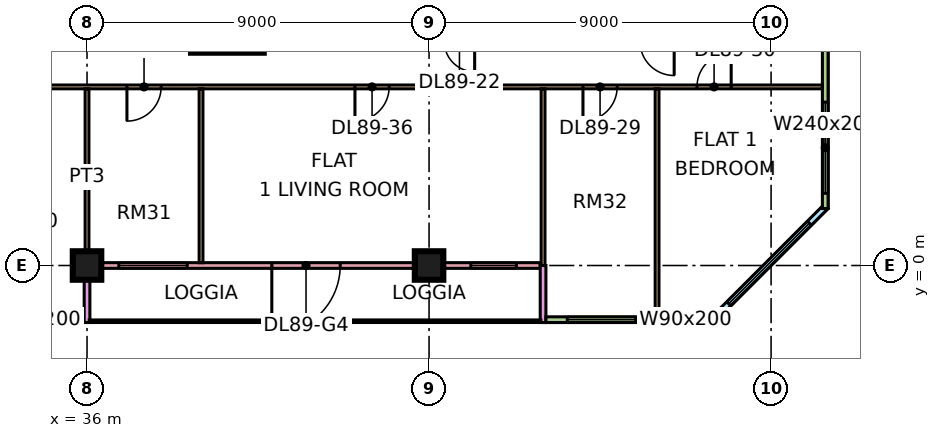
"""IFC4 building model, lengths in metres.
Left out: names, types, materials, properties, quantities, classifications, styles, units other than length and angle.
Written with IfcOpenShell. Run it as: python <this file> out.ifc"""

import sys

from ifc_helpers import new_model, si_unit, direction, frame, frame_2d, origin, origin_2d, place, context, subcontext, project, spatial, rectangle, extrude, element, fill, save


model = new_model("IFC4")
c1 = context("Model", 3, precision=1e-05, world=origin(), true_north=direction((0.0, 1.0)))
c2 = subcontext(c1, "Body", "Model", "MODEL_VIEW")
j1 = project(units=[si_unit("LENGTHUNIT", "METRE"), si_unit("PLANEANGLEUNIT", "RADIAN")], contexts=[c1])
p1 = place(None, origin())
s1 = spatial("IfcSite", under=j1, at=p1, CompositionType="ELEMENT")
p2 = place(p1, origin())
s2 = spatial("IfcBuilding", under=s1, at=p2, CompositionType="ELEMENT")
p3 = place(p2, frame((0.0, 0.0, 380.15)))
s3 = spatial("IfcBuildingStorey", under=s2, at=p3, CompositionType="ELEMENT", Elevation=380.15)
for number, where, z_axis, x_axis in (
    (1, (36.0, 0.0, 0.0), (0.0, 0.0, 1.0), (1.0, 0.0, 0.0)),
    (2, (45.0, 0.0, 0.0), (0.0, 0.0, 1.0), (1.0, 0.0, 0.0)),
):
    element("IfcColumn", number, at=place(p3, frame(where, z_axis=z_axis, x_axis=x_axis)), inside=s3, PredefinedType="COLUMN", context=c2, shape_type="SweptSolid", body=[
        extrude(rectangle(XDim=0.75, YDim=0.75, at=origin_2d()), origin(), (0.0, 0.0, 1.0), 3.75),
    ])
p4 = place(p3, frame((37.2, 5.725, 0.0), z_axis=(0.0, 0.0, 1.0), x_axis=(1.0, 0.0, 0.0)))
e3 = element("IfcWall", 3, at=p4, inside=s3, PredefinedType="SHEAR", context=c2, shape_type="SweptSolid", body=[
    extrude(rectangle(XDim=3.45, YDim=0.25, at=frame_2d((1.725, 0.0))), origin(), (0.0, 0.0, 1.0), 3.75),
])
p5 = place(p3, frame((24.075, -1.425, 0.0), z_axis=(0.0, 0.0, 1.0), x_axis=(1.0, 0.0, 0.0)))
e4 = element("IfcWall", 4, at=p5, inside=s3, PredefinedType="SOLIDWALL", context=c2, shape_type="SweptSolid", body=[
    extrude(rectangle(XDim=11.85, YDim=0.15, at=frame_2d((5.925, 0.0))), origin(), (0.0, 0.0, 1.0), 3.3),
])
p6 = place(p5, frame((2.962, 0.0, 0.45)))
e5 = element("IfcOpeningElement", 5, at=p6, cuts=e4, PredefinedType="OPENING", context=c2, shape_type="SweptSolid", body=[
    extrude(rectangle(XDim=3.0, YDim=2.0, at=frame_2d((1.5, 1.0))), frame((0.0, 0.085, 0.0), z_axis=(0.0, -1.0, 0.0), x_axis=(1.0, 0.0, 0.0)), (0.0, 0.0, 1.0), 0.17),
])
p7 = place(p5, frame((9.488, 0.0, 0.45)))
e6 = element("IfcOpeningElement", 6, at=p7, cuts=e4, PredefinedType="OPENING", context=c2, shape_type="SweptSolid", body=[
    extrude(rectangle(XDim=1.8, YDim=2.0, at=frame_2d((0.9, 1.0))), frame((0.0, 0.085, 0.0), z_axis=(0.0, -1.0, 0.0), x_axis=(1.0, 0.0, 0.0)), (0.0, 0.0, 1.0), 0.17),
])
p8 = place(p3, frame((36.075, 0.0, 0.0), z_axis=(0.0, 0.0, 1.0), x_axis=(1.0, 0.0, 0.0)))
e7 = element("IfcWall", 7, at=p8, inside=s3, PredefinedType="SOLIDWALL", context=c2, shape_type="SweptSolid", body=[
    extrude(rectangle(XDim=11.85, YDim=0.15, at=frame_2d((5.925, 0.0))), origin(), (0.0, 0.0, 1.0), 3.3),
])
p9 = place(p8, frame((0.762, 0.0, 0.45)))
e8 = element("IfcOpeningElement", 8, at=p9, cuts=e7, PredefinedType="OPENING", context=c2, shape_type="SweptSolid", body=[
    extrude(rectangle(XDim=1.8, YDim=2.0, at=frame_2d((0.9, 1.0))), frame((0.0, 0.085, 0.0), z_axis=(0.0, -1.0, 0.0), x_axis=(1.0, 0.0, 0.0)), (0.0, 0.0, 1.0), 0.17),
])
p10 = place(p8, frame((4.788, 0.0, 0.0)))
e9 = element("IfcOpeningElement", 9, at=p10, cuts=e7, PredefinedType="OPENING", context=c2, shape_type="SweptSolid", body=[
    extrude(rectangle(XDim=1.8, YDim=2.4, at=frame_2d((0.9, 1.2))), frame((0.0, 0.085, 0.0), z_axis=(0.0, -1.0, 0.0), x_axis=(1.0, 0.0, 0.0)), (0.0, 0.0, 1.0), 0.17),
])
p11 = place(p8, frame((10.025, 0.0, 0.45)))
e10 = element("IfcOpeningElement", 10, at=p11, cuts=e7, PredefinedType="OPENING", context=c2, shape_type="SweptSolid", body=[
    extrude(rectangle(XDim=1.2, YDim=2.0, at=frame_2d((0.6, 1.0))), frame((0.0, 0.085, 0.0), z_axis=(0.0, -1.0, 0.0), x_axis=(1.0, 0.0, 0.0)), (0.0, 0.0, 1.0), 0.17),
])
for number, where, z_axis, x_axis in (
    (11, (36.0, -1.5, 0.0), (0.0, 0.0, 1.0), (0.0, 1.0, 0.0)),
    (12, (48.0, -1.5, 0.0), (0.0, 0.0, 1.0), (0.0, 1.0, 0.0)),
):
    element("IfcWall", number, at=place(p3, frame(where, z_axis=z_axis, x_axis=x_axis)), inside=s3, PredefinedType="SOLIDWALL", context=c2, shape_type="SweptSolid", body=[
        extrude(rectangle(XDim=1.5, YDim=0.15, at=frame_2d((0.75, 0.0))), origin(), (0.0, 0.0, 1.0), 3.3),
    ])
p12 = place(p3, frame((48.075, -1.425, 0.0), z_axis=(0.0, 0.0, 1.0), x_axis=(1.0, 0.0, 0.0)))
e13 = element("IfcWall", 13, at=p12, inside=s3, PredefinedType="SOLIDWALL", context=c2, shape_type="SweptSolid", body=[
    extrude(rectangle(XDim=4.425, YDim=0.15, at=frame_2d((2.212, 0.0))), origin(), (0.0, 0.0, 1.0), 3.3),
])
p13 = place(p12, frame((0.562, 0.0, 0.45)))
e14 = element("IfcOpeningElement", 14, at=p13, cuts=e13, PredefinedType="OPENING", context=c2, shape_type="SweptSolid", body=[
    extrude(rectangle(XDim=1.8, YDim=2.0, at=frame_2d((0.9, 1.0))), frame((0.0, 0.085, 0.0), z_axis=(0.0, -1.0, 0.0), x_axis=(1.0, 0.0, 0.0)), (0.0, 0.0, 1.0), 0.17),
])
p14 = place(p12, frame((3.225, 0.0, 0.45)))
e15 = element("IfcOpeningElement", 15, at=p14, cuts=e13, PredefinedType="OPENING", context=c2, shape_type="SweptSolid", body=[
    extrude(rectangle(XDim=0.9, YDim=2.0, at=frame_2d((0.45, 1.0))), frame((0.0, 0.085, 0.0), z_axis=(0.0, -1.0, 0.0), x_axis=(1.0, 0.0, 0.0)), (0.0, 0.0, 1.0), 0.17),
])
p15 = place(p3, frame((52.447, -1.447, 0.0), z_axis=(0.0, 0.0, 1.0), x_axis=(0.707106781187, 0.707106781187, 0.0)))
e16 = element("IfcWall", 16, at=p15, inside=s3, PredefinedType="SOLIDWALL", context=c2, shape_type="SweptSolid", body=[
    extrude(rectangle(XDim=4.243, YDim=0.15, at=frame_2d((2.121, 0.0))), origin(), (0.0, 0.0, 1.0), 3.3),
])
p16 = place(p15, frame((0.621, 0.0, 0.45)))
e17 = element("IfcOpeningElement", 17, at=p16, cuts=e16, PredefinedType="OPENING", context=c2, shape_type="SweptSolid", body=[
    extrude(rectangle(XDim=3.0, YDim=2.0, at=frame_2d((1.5, 1.0))), frame((0.0, 0.085, 0.0), z_axis=(0.0, -1.0, 0.0), x_axis=(1.0, 0.0, 0.0)), (0.0, 0.0, 1.0), 0.17),
])
p17 = place(p3, frame((55.425, 1.5, 0.0), z_axis=(0.0, 0.0, 1.0), x_axis=(0.0, 1.0, 0.0)))
e18 = element("IfcWall", 18, at=p17, inside=s3, PredefinedType="SOLIDWALL", context=c2, shape_type="SweptSolid", body=[
    extrude(rectangle(XDim=10.425, YDim=0.15, at=frame_2d((5.212, 0.0))), origin(), (0.0, 0.0, 1.0), 3.3),
])
p18 = place(p17, frame((0.4, 0.0, 0.45)))
e19 = element("IfcOpeningElement", 19, at=p18, cuts=e18, PredefinedType="OPENING", context=c2, shape_type="SweptSolid", body=[
    extrude(rectangle(XDim=2.4, YDim=2.0, at=frame_2d((1.2, 1.0))), frame((0.0, 0.085, 0.0), z_axis=(0.0, -1.0, 0.0), x_axis=(1.0, 0.0, 0.0)), (0.0, 0.0, 1.0), 0.17),
])
p19 = place(p3, frame((33.05, 4.7, 0.0), z_axis=(0.0, 0.0, 1.0), x_axis=(1.0, 0.0, 0.0)))
e20 = element("IfcWall", 20, at=p19, inside=s3, PredefinedType="PARTITIONING", context=c2, shape_type="SweptSolid", body=[
    extrude(rectangle(XDim=22.301, YDim=0.1, at=frame_2d((11.15, 0.0))), origin(), (0.0, 0.0, 1.0), 3.3),
])
p20 = place(p19, frame((1.0, 0.0, 0.0)))
e21 = element("IfcOpeningElement", 21, at=p20, cuts=e20, PredefinedType="OPENING", context=c2, shape_type="SweptSolid", body=[
    extrude(rectangle(XDim=0.9, YDim=2.1, at=frame_2d((0.45, 1.05))), frame((0.0, 0.06, 0.0), z_axis=(0.0, -1.0, 0.0), x_axis=(1.0, 0.0, 0.0)), (0.0, 0.0, 1.0), 0.12),
])
p21 = place(p19, frame((4.0, 0.0, 0.0)))
e22 = element("IfcOpeningElement", 22, at=p21, cuts=e20, PredefinedType="OPENING", context=c2, shape_type="SweptSolid", body=[
    extrude(rectangle(XDim=0.9, YDim=2.1, at=frame_2d((0.45, 1.05))), frame((0.0, 0.06, 0.0), z_axis=(0.0, -1.0, 0.0), x_axis=(1.0, 0.0, 0.0)), (0.0, 0.0, 1.0), 0.12),
])
p22 = place(p19, frame((16.0, 0.0, 0.0)))
e23 = element("IfcOpeningElement", 23, at=p22, cuts=e20, PredefinedType="OPENING", context=c2, shape_type="SweptSolid", body=[
    extrude(rectangle(XDim=0.9, YDim=2.1, at=frame_2d((0.45, 1.05))), frame((0.0, 0.06, 0.0), z_axis=(0.0, -1.0, 0.0), x_axis=(1.0, 0.0, 0.0)), (0.0, 0.0, 1.0), 0.12),
])
p23 = place(p19, frame((19.0, 0.0, 0.0)))
e24 = element("IfcOpeningElement", 24, at=p23, cuts=e20, PredefinedType="OPENING", context=c2, shape_type="SweptSolid", body=[
    extrude(rectangle(XDim=0.9, YDim=2.1, at=frame_2d((0.45, 1.05))), frame((0.0, 0.06, 0.0), z_axis=(0.0, -1.0, 0.0), x_axis=(1.0, 0.0, 0.0)), (0.0, 0.0, 1.0), 0.12),
])
p24 = place(p19, frame((10.0, 0.0, 0.0)))
e25 = element("IfcOpeningElement", 25, at=p24, cuts=e20, PredefinedType="OPENING", context=c2, shape_type="SweptSolid", body=[
    extrude(rectangle(XDim=0.9, YDim=2.1, at=frame_2d((0.45, 1.05))), frame((0.0, 0.06, 0.0), z_axis=(0.0, -1.0, 0.0), x_axis=(1.0, 0.0, 0.0)), (0.0, 0.0, 1.0), 0.12),
])
p25 = place(p3, frame((36.0, 0.0, 0.0), z_axis=(0.0, 0.0, 1.0), x_axis=(0.0, 1.0, 0.0)))
e26 = element("IfcWall", 26, at=p25, inside=s3, PredefinedType="PARTITIONING", context=c2, shape_type="SweptSolid", body=[
    extrude(rectangle(XDim=4.65, YDim=0.1, at=frame_2d((2.325, 0.0))), origin(), (0.0, 0.0, 1.0), 3.3),
])
p26 = place(p3, frame((39.0, 0.074, 0.0), z_axis=(0.0, 0.0, 1.0), x_axis=(0.0, 1.0, 0.0)))
e27 = element("IfcWall", 27, at=p26, inside=s3, PredefinedType="PARTITIONING", context=c2, shape_type="SweptSolid", body=[
    extrude(rectangle(XDim=4.576, YDim=0.1, at=frame_2d((2.288, 0.0))), origin(), (0.0, 0.0, 1.0), 3.3),
])
p27 = place(p3, frame((48.0, 0.0, 0.0), z_axis=(0.0, 0.0, 1.0), x_axis=(0.0, 1.0, 0.0)))
e28 = element("IfcWall", 28, at=p27, inside=s3, PredefinedType="PARTITIONING", context=c2, shape_type="SweptSolid", body=[
    extrude(rectangle(XDim=4.65, YDim=0.1, at=frame_2d((2.325, 0.0))), origin(), (0.0, 0.0, 1.0), 3.3),
])
p28 = place(p3, frame((51.0, -1.351, 0.0), z_axis=(0.0, 0.0, 1.0), x_axis=(0.0, 1.0, 0.0)))
e29 = element("IfcWall", 29, at=p28, inside=s3, PredefinedType="PARTITIONING", context=c2, shape_type="SweptSolid", body=[
    extrude(rectangle(XDim=6.001, YDim=0.1, at=frame_2d((3.0, 0.0))), origin(), (0.0, 0.0, 1.0), 3.3),
])
p29 = place(p7, origin())
e30 = element("IfcWindow", 30, at=p29, inside=s3, PartitioningType="SINGLE_PANEL", PredefinedType="WINDOW", context=c2, shape_type="SweptSolid", body=[
    extrude(rectangle(XDim=1.8, YDim=2.0, at=frame_2d((0.9, 1.0))), frame((0.0, 0.03, 0.0), z_axis=(0.0, -1.0, 0.0), x_axis=(1.0, 0.0, 0.0)), (0.0, 0.0, 1.0), 0.06),
])
fill(e6, e30)
p30 = place(p9, origin())
e31 = element("IfcWindow", 31, at=p30, inside=s3, PartitioningType="SINGLE_PANEL", PredefinedType="WINDOW", context=c2, shape_type="SweptSolid", body=[
    extrude(rectangle(XDim=1.8, YDim=2.0, at=frame_2d((0.9, 1.0))), frame((0.0, 0.03, 0.0), z_axis=(0.0, -1.0, 0.0), x_axis=(1.0, 0.0, 0.0)), (0.0, 0.0, 1.0), 0.06),
])
fill(e8, e31)
p31 = place(p10, frame((1.8, 0.0, 0.0), z_axis=(0.0, 0.0, 1.0), x_axis=(-1.0, 0.0, 0.0)))
e32 = element("IfcDoor", 32, at=p31, inside=s3, OperationType="DOUBLE_DOOR_SINGLE_SWING", PredefinedType="DOOR", context=c2, shape_type="SweptSolid", body=[
    extrude(rectangle(XDim=1.8, YDim=2.4, at=frame_2d((0.9, 1.2))), frame((0.0, 0.025, 0.0), z_axis=(0.0, -1.0, 0.0), x_axis=(1.0, 0.0, 0.0)), (0.0, 0.0, 1.0), 0.05),
])
fill(e9, e32)
p32 = place(p11, origin())
e33 = element("IfcWindow", 33, at=p32, inside=s3, PartitioningType="SINGLE_PANEL", PredefinedType="WINDOW", context=c2, shape_type="SweptSolid", body=[
    extrude(rectangle(XDim=1.2, YDim=2.0, at=frame_2d((0.6, 1.0))), frame((0.0, 0.03, 0.0), z_axis=(0.0, -1.0, 0.0), x_axis=(1.0, 0.0, 0.0)), (0.0, 0.0, 1.0), 0.06),
])
fill(e10, e33)
p33 = place(p13, origin())
e34 = element("IfcWindow", 34, at=p33, inside=s3, PartitioningType="SINGLE_PANEL", PredefinedType="WINDOW", context=c2, shape_type="SweptSolid", body=[
    extrude(rectangle(XDim=1.8, YDim=2.0, at=frame_2d((0.9, 1.0))), frame((0.0, 0.03, 0.0), z_axis=(0.0, -1.0, 0.0), x_axis=(1.0, 0.0, 0.0)), (0.0, 0.0, 1.0), 0.06),
])
fill(e14, e34)
p34 = place(p14, origin())
e35 = element("IfcWindow", 35, at=p34, inside=s3, PartitioningType="SINGLE_PANEL", PredefinedType="WINDOW", context=c2, shape_type="SweptSolid", body=[
    extrude(rectangle(XDim=0.9, YDim=2.0, at=frame_2d((0.45, 1.0))), frame((0.0, 0.03, 0.0), z_axis=(0.0, -1.0, 0.0), x_axis=(1.0, 0.0, 0.0)), (0.0, 0.0, 1.0), 0.06),
])
fill(e15, e35)
p35 = place(p16, origin())
e36 = element("IfcWindow", 36, at=p35, inside=s3, PartitioningType="SINGLE_PANEL", PredefinedType="WINDOW", context=c2, shape_type="SweptSolid", body=[
    extrude(rectangle(XDim=3.0, YDim=2.0, at=frame_2d((1.5, 1.0))), frame((0.0, 0.03, 0.0), z_axis=(0.0, -1.0, 0.0), x_axis=(1.0, 0.0, 0.0)), (0.0, 0.0, 1.0), 0.06),
])
fill(e17, e36)
p36 = place(p18, origin())
e37 = element("IfcWindow", 37, at=p36, inside=s3, PartitioningType="SINGLE_PANEL", PredefinedType="WINDOW", context=c2, shape_type="SweptSolid", body=[
    extrude(rectangle(XDim=2.4, YDim=2.0, at=frame_2d((1.2, 1.0))), frame((0.0, 0.03, 0.0), z_axis=(0.0, -1.0, 0.0), x_axis=(1.0, 0.0, 0.0)), (0.0, 0.0, 1.0), 0.06),
])
fill(e19, e37)
p37 = place(p21, frame((0.9, 0.0, 0.0), z_axis=(0.0, 0.0, 1.0), x_axis=(-1.0, 0.0, 0.0)))
e38 = element("IfcDoor", 38, at=p37, inside=s3, OperationType="SINGLE_SWING_LEFT", PredefinedType="DOOR", context=c2, shape_type="SweptSolid", body=[
    extrude(rectangle(XDim=0.9, YDim=2.1, at=frame_2d((0.45, 1.05))), frame((0.0, 0.025, 0.0), z_axis=(0.0, -1.0, 0.0), x_axis=(1.0, 0.0, 0.0)), (0.0, 0.0, 1.0), 0.05),
])
fill(e22, e38)
p38 = place(p22, frame((0.9, 0.0, 0.0), z_axis=(0.0, 0.0, 1.0), x_axis=(-1.0, 0.0, 0.0)))
e39 = element("IfcDoor", 39, at=p38, inside=s3, OperationType="SINGLE_SWING_LEFT", PredefinedType="DOOR", context=c2, shape_type="SweptSolid", body=[
    extrude(rectangle(XDim=0.9, YDim=2.1, at=frame_2d((0.45, 1.05))), frame((0.0, 0.025, 0.0), z_axis=(0.0, -1.0, 0.0), x_axis=(1.0, 0.0, 0.0)), (0.0, 0.0, 1.0), 0.05),
])
fill(e23, e39)
p39 = place(p23, frame((0.9, 0.0, 0.0), z_axis=(0.0, 0.0, 1.0), x_axis=(-1.0, 0.0, 0.0)))
e40 = element("IfcDoor", 40, at=p39, inside=s3, OperationType="SINGLE_SWING_RIGHT", PredefinedType="DOOR", context=c2, shape_type="SweptSolid", body=[
    extrude(rectangle(XDim=0.9, YDim=2.1, at=frame_2d((0.45, 1.05))), frame((0.0, 0.025, 0.0), z_axis=(0.0, -1.0, 0.0), x_axis=(1.0, 0.0, 0.0)), (0.0, 0.0, 1.0), 0.05),
])
fill(e24, e40)
p40 = place(p24, frame((0.9, 0.0, 0.0), z_axis=(0.0, 0.0, 1.0), x_axis=(-1.0, 0.0, 0.0)))
e41 = element("IfcDoor", 41, at=p40, inside=s3, OperationType="SINGLE_SWING_LEFT", PredefinedType="DOOR", context=c2, shape_type="SweptSolid", body=[
    extrude(rectangle(XDim=0.9, YDim=2.1, at=frame_2d((0.45, 1.05))), frame((0.0, 0.025, 0.0), z_axis=(0.0, -1.0, 0.0), x_axis=(1.0, 0.0, 0.0)), (0.0, 0.0, 1.0), 0.05),
])
fill(e25, e41)
save(model, sys.argv[1])
